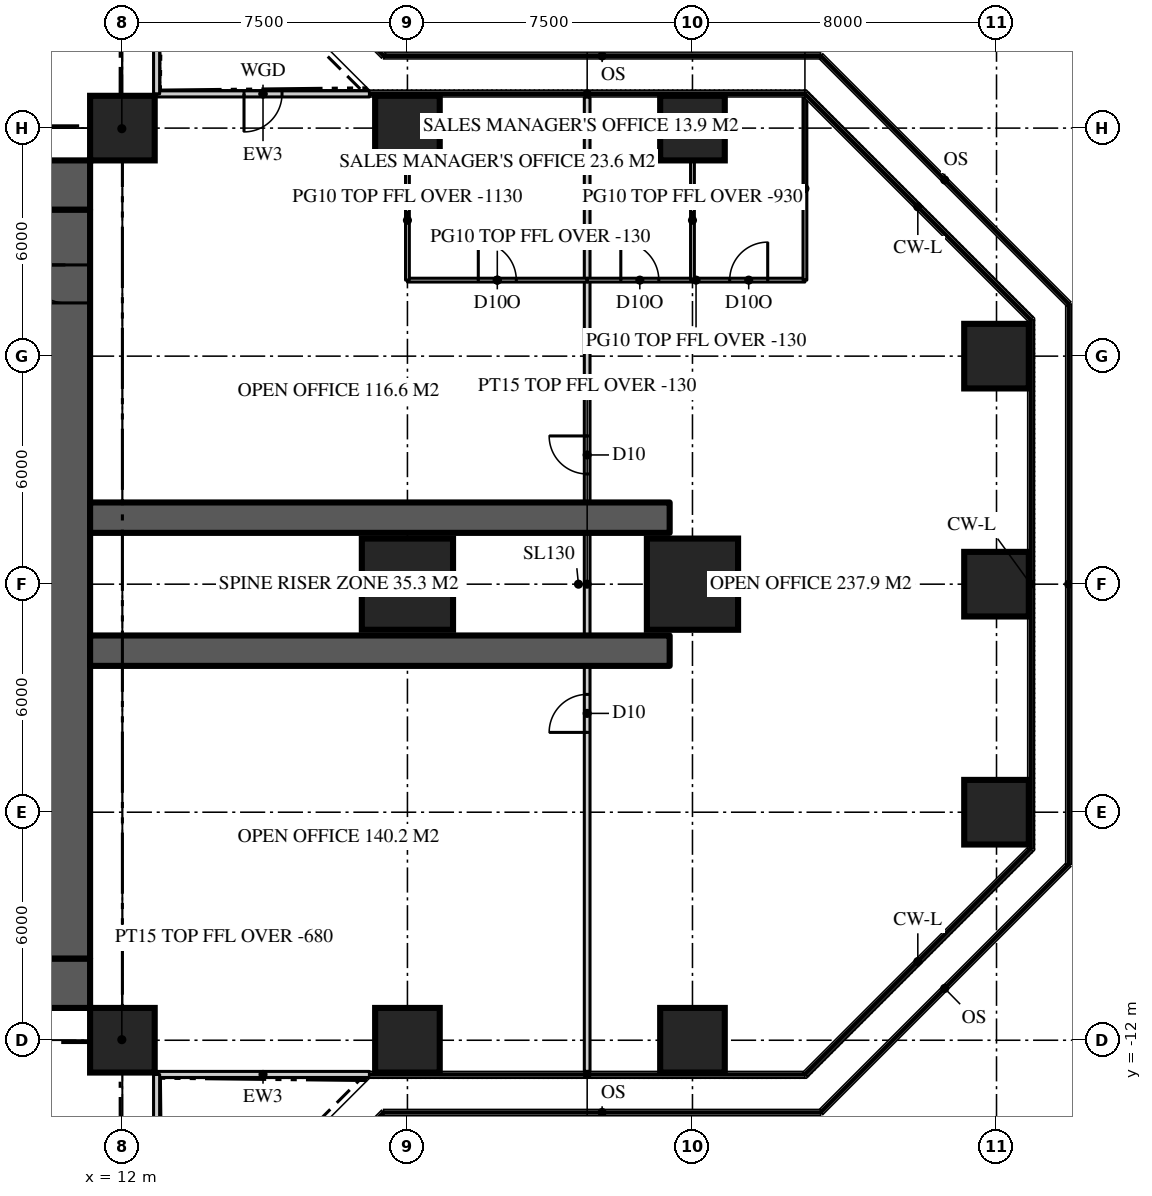
"""IFC4 building model, lengths in metres.
Left out: names, types, materials, properties, quantities, classifications, styles, units other than length and angle.
Written with IfcOpenShell. Run it as: python <this file> out.ifc"""

import sys

from ifc_helpers import new_model, si_unit, direction, frame, frame_2d, origin, origin_2d, place, context, subcontext, project, spatial, rectangle, extrude, element, fill, save


model = new_model("IFC4")
c1 = context("Model", 3, precision=1e-05, world=origin(), true_north=direction((0.0, 1.0)))
c2 = subcontext(c1, "Body", "Model", "MODEL_VIEW")
j1 = project(units=[si_unit("LENGTHUNIT", "METRE"), si_unit("PLANEANGLEUNIT", "RADIAN")], contexts=[c1])
p1 = place(None, origin())
s1 = spatial("IfcSite", under=j1, at=p1, CompositionType="ELEMENT")
p2 = place(p1, origin())
s2 = spatial("IfcBuilding", under=s1, at=p2, CompositionType="ELEMENT")
p3 = place(p2, frame((0.0, 0.0, 94.2)))
s3 = spatial("IfcBuildingStorey", under=s2, at=p3, CompositionType="ELEMENT", Elevation=94.2)
p4 = place(p3, frame((-11.15, 10.5, 0.0), z_axis=(0.0, 0.0, 1.0), x_axis=(1.0, 0.0, 0.0)))
e1 = element("IfcWall", 1, at=p4, inside=s3, PredefinedType="SHEAR", context=c2, shape_type="SweptSolid", body=[
    extrude(rectangle(XDim=22.3, YDim=1.3, at=frame_2d((11.15, 0.0))), origin(), (0.0, 0.0, 1.0), 3.9),
])
p5 = place(p4, frame((4.25, 0.0, 0.0)))
e2 = element("IfcOpeningElement", 2, at=p5, cuts=e1, PredefinedType="OPENING", context=c2, shape_type="SweptSolid", body=[
    extrude(rectangle(XDim=1.8, YDim=2.2, at=frame_2d((0.9, 1.1))), frame((0.0, 0.66, 0.0), z_axis=(0.0, -1.0, 0.0), x_axis=(1.0, 0.0, 0.0)), (0.0, 0.0, 1.0), 1.32),
])
p6 = place(p4, frame((16.25, 0.0, 0.0)))
e3 = element("IfcOpeningElement", 3, at=p6, cuts=e1, PredefinedType="OPENING", context=c2, shape_type="SweptSolid", body=[
    extrude(rectangle(XDim=1.8, YDim=2.2, at=frame_2d((0.9, 1.1))), frame((0.0, 0.66, 0.0), z_axis=(0.0, -1.0, 0.0), x_axis=(1.0, 0.0, 0.0)), (0.0, 0.0, 1.0), 1.32),
])
p7 = place(p3, frame((11.15, -10.5, 0.0), z_axis=(0.0, 0.0, 1.0), x_axis=(-1.0, 0.0, 0.0)))
e4 = element("IfcWall", 4, at=p7, inside=s3, PredefinedType="SHEAR", context=c2, shape_type="SweptSolid", body=[
    extrude(rectangle(XDim=22.3, YDim=1.3, at=frame_2d((11.15, 0.0))), origin(), (0.0, 0.0, 1.0), 3.9),
])
p8 = place(p7, frame((16.25, 0.0, 0.0)))
e5 = element("IfcOpeningElement", 5, at=p8, cuts=e4, PredefinedType="OPENING", context=c2, shape_type="SweptSolid", body=[
    extrude(rectangle(XDim=1.8, YDim=2.2, at=frame_2d((0.9, 1.1))), frame((0.0, 0.66, 0.0), z_axis=(0.0, -1.0, 0.0), x_axis=(1.0, 0.0, 0.0)), (0.0, 0.0, 1.0), 1.32),
])
p9 = place(p7, frame((4.25, 0.0, 0.0)))
e6 = element("IfcOpeningElement", 6, at=p9, cuts=e4, PredefinedType="OPENING", context=c2, shape_type="SweptSolid", body=[
    extrude(rectangle(XDim=1.8, YDim=2.2, at=frame_2d((0.9, 1.1))), frame((0.0, 0.66, 0.0), z_axis=(0.0, -1.0, 0.0), x_axis=(1.0, 0.0, 0.0)), (0.0, 0.0, 1.0), 1.32),
])
p10 = place(p3, frame((10.5, -9.85, 0.0), z_axis=(0.0, 0.0, 1.0), x_axis=(0.0, 1.0, 0.0)))
e7 = element("IfcWall", 7, at=p10, inside=s3, PredefinedType="SHEAR", context=c2, shape_type="SweptSolid", body=[
    extrude(rectangle(XDim=19.7, YDim=1.3, at=frame_2d((9.85, 0.0))), origin(), (0.0, 0.0, 1.0), 3.9),
])
p11 = place(p10, frame((17.25, 0.0, 0.0)))
e8 = element("IfcOpeningElement", 8, at=p11, cuts=e7, PredefinedType="OPENING", context=c2, shape_type="SweptSolid", body=[
    extrude(rectangle(XDim=1.0, YDim=2.2, at=frame_2d((0.5, 1.1))), frame((0.0, 0.66, 0.0), z_axis=(0.0, -1.0, 0.0), x_axis=(1.0, 0.0, 0.0)), (0.0, 0.0, 1.0), 1.32),
])
for number, where, z_axis, x_axis in (
    (9, (11.15, -1.75, 0.0), (0.0, 0.0, 1.0), (1.0, 0.0, 0.0)),
    (10, (11.15, 1.75, 0.0), (0.0, 0.0, 1.0), (1.0, 0.0, 0.0)),
):
    element("IfcWall", number, at=place(p3, frame(where, z_axis=z_axis, x_axis=x_axis)), inside=s3, PredefinedType="SHEAR", context=c2, shape_type="SweptSolid", body=[
        extrude(rectangle(XDim=15.25, YDim=0.8, at=frame_2d((7.625, 0.0))), origin(), (0.0, 0.0, 1.0), 3.9),
    ])
for number, where, z_axis, x_axis in (
    (11, (12.0, -12.0, 0.0), (0.0, 0.0, 1.0), (1.0, 0.0, 0.0)),
    (12, (19.5, -12.0, 0.0), (0.0, 0.0, 1.0), (1.0, 0.0, 0.0)),
    (13, (27.0, -12.0, 0.0), (0.0, 0.0, 1.0), (1.0, 0.0, 0.0)),
    (14, (35.0, -6.0, 0.0), (0.0, 0.0, 1.0), (1.0, 0.0, 0.0)),
):
    element("IfcColumn", number, at=place(p3, frame(where, z_axis=z_axis, x_axis=x_axis)), inside=s3, PredefinedType="COLUMN", context=c2, shape_type="SweptSolid", body=[
        extrude(rectangle(XDim=1.7, YDim=1.7, at=origin_2d()), origin(), (0.0, 0.0, 1.0), 3.9),
    ])
for number, where, z_axis, x_axis in (
    (15, (19.5, 0.0, 0.0), (0.0, 0.0, 1.0), (1.0, 0.0, 0.0)),
    (16, (27.0, 0.0, 0.0), (0.0, 0.0, 1.0), (1.0, 0.0, 0.0)),
):
    element("IfcColumn", number, at=place(p3, frame(where, z_axis=z_axis, x_axis=x_axis)), inside=s3, PredefinedType="COLUMN", context=c2, shape_type="SweptSolid", body=[
        extrude(rectangle(XDim=2.4, YDim=2.4, at=origin_2d()), origin(), (0.0, 0.0, 1.0), 3.9),
    ])
for number, where, z_axis, x_axis in (
    (17, (35.0, 0.0, 0.0), (0.0, 0.0, 1.0), (1.0, 0.0, 0.0)),
    (18, (35.0, 6.0, 0.0), (0.0, 0.0, 1.0), (1.0, 0.0, 0.0)),
    (19, (12.0, 12.0, 0.0), (0.0, 0.0, 1.0), (1.0, 0.0, 0.0)),
    (20, (19.5, 12.0, 0.0), (0.0, 0.0, 1.0), (1.0, 0.0, 0.0)),
    (21, (27.0, 12.0, 0.0), (0.0, 0.0, 1.0), (1.0, 0.0, 0.0)),
):
    element("IfcColumn", number, at=place(p3, frame(where, z_axis=z_axis, x_axis=x_axis)), inside=s3, PredefinedType="COLUMN", context=c2, shape_type="SweptSolid", body=[
        extrude(rectangle(XDim=1.7, YDim=1.7, at=origin_2d()), origin(), (0.0, 0.0, 1.0), 3.9),
    ])
p12 = place(p3, frame((12.9, -12.9, 0.0), z_axis=(0.0, 0.0, 1.0), x_axis=(1.0, 0.0, 0.0)))
e22 = element("IfcWall", 22, at=p12, inside=s3, PredefinedType="SOLIDWALL", context=c2, shape_type="SweptSolid", body=[
    extrude(rectangle(XDim=5.6, YDim=0.16, at=frame_2d((2.8, 0.0))), origin(), (0.0, 0.0, 1.0), 3.77),
])
p13 = place(p3, frame((18.5, 12.9, 0.0), z_axis=(0.0, 0.0, 1.0), x_axis=(-1.0, 0.0, 0.0)))
e23 = element("IfcWall", 23, at=p13, inside=s3, PredefinedType="SOLIDWALL", context=c2, shape_type="SweptSolid", body=[
    extrude(rectangle(XDim=5.6, YDim=0.16, at=frame_2d((2.8, 0.0))), origin(), (0.0, 0.0, 1.0), 3.77),
])
p14 = place(p13, frame((2.3, 0.0, 0.0)))
e24 = element("IfcOpeningElement", 24, at=p14, cuts=e23, PredefinedType="OPENING", context=c2, shape_type="SweptSolid", body=[
    extrude(rectangle(XDim=1.0, YDim=2.2, at=frame_2d((0.5, 1.1))), frame((0.0, 0.09, 0.0), z_axis=(0.0, -1.0, 0.0), x_axis=(1.0, 0.0, 0.0)), (0.0, 0.0, 1.0), 0.18),
])
p15 = place(p3, frame((12.9, 12.9, 0.0), z_axis=(0.0, 0.0, 1.0), x_axis=(0.0, 1.0, 0.0)))
e25 = element("IfcWall", 25, at=p15, inside=s3, PredefinedType="SOLIDWALL", context=c2, shape_type="SweptSolid", body=[
    extrude(rectangle(XDim=5.6, YDim=0.16, at=frame_2d((2.8, 0.0))), origin(), (0.0, 0.0, 1.0), 3.77),
])
p16 = place(p3, frame((12.9, -18.5, 0.0), z_axis=(0.0, 0.0, 1.0), x_axis=(0.0, 1.0, 0.0)))
e26 = element("IfcWall", 26, at=p16, inside=s3, PredefinedType="SOLIDWALL", context=c2, shape_type="SweptSolid", body=[
    extrude(rectangle(XDim=5.6, YDim=0.16, at=frame_2d((2.8, 0.0))), origin(), (0.0, 0.0, 1.0), 3.77),
])
p17 = place(p16, frame((2.3, 0.0, 0.0)))
e27 = element("IfcOpeningElement", 27, at=p17, cuts=e26, PredefinedType="OPENING", context=c2, shape_type="SweptSolid", body=[
    extrude(rectangle(XDim=1.0, YDim=2.2, at=frame_2d((0.5, 1.1))), frame((0.0, 0.09, 0.0), z_axis=(0.0, -1.0, 0.0), x_axis=(1.0, 0.0, 0.0)), (0.0, 0.0, 1.0), 0.18),
])
p18 = place(p3, frame((24.229, -12.82, 0.0), z_axis=(0.0, 0.0, 1.0), x_axis=(0.0, 1.0, 0.0)))
e28 = element("IfcWall", 28, at=p18, inside=s3, PredefinedType="PARTITIONING", context=c2, shape_type="SweptSolid", body=[
    extrude(rectangle(XDim=25.64, YDim=0.15, at=frame_2d((12.82, 0.0))), origin(), (0.0, 0.0, 1.0), 3.77),
])
p19 = place(p18, frame((15.72, 0.0, 0.0)))
e29 = element("IfcOpeningElement", 29, at=p19, cuts=e28, PredefinedType="OPENING", context=c2, shape_type="SweptSolid", body=[
    extrude(rectangle(XDim=1.0, YDim=2.2, at=frame_2d((0.5, 1.1))), frame((0.0, 0.085, 0.0), z_axis=(0.0, -1.0, 0.0), x_axis=(1.0, 0.0, 0.0)), (0.0, 0.0, 1.0), 0.17),
])
p20 = place(p18, frame((8.92, 0.0, 0.0)))
e30 = element("IfcOpeningElement", 30, at=p20, cuts=e28, PredefinedType="OPENING", context=c2, shape_type="SweptSolid", body=[
    extrude(rectangle(XDim=1.0, YDim=2.2, at=frame_2d((0.5, 1.1))), frame((0.0, 0.085, 0.0), z_axis=(0.0, -1.0, 0.0), x_axis=(1.0, 0.0, 0.0)), (0.0, 0.0, 1.0), 0.17),
])
p21 = place(p3, frame((19.5, 8.0, 0.0), z_axis=(0.0, 0.0, 1.0), x_axis=(1.0, 0.0, 0.0)))
e31 = element("IfcWall", 31, at=p21, inside=s3, PredefinedType="PARTITIONING", context=c2, shape_type="SweptSolid", body=[
    extrude(rectangle(XDim=4.729, YDim=0.1, at=frame_2d((2.365, 0.0))), origin(), (0.0, 0.0, 1.0), 3.77),
])
p22 = place(p21, frame((1.865, 0.0, 0.0)))
e32 = element("IfcOpeningElement", 32, at=p22, cuts=e31, PredefinedType="OPENING", context=c2, shape_type="SweptSolid", body=[
    extrude(rectangle(XDim=1.0, YDim=2.2, at=frame_2d((0.5, 1.1))), frame((0.0, 0.06, 0.0), z_axis=(0.0, -1.0, 0.0), x_axis=(1.0, 0.0, 0.0)), (0.0, 0.0, 1.0), 0.12),
])
p23 = place(p3, frame((24.229, 8.0, 0.0), z_axis=(0.0, 0.0, 1.0), x_axis=(1.0, 0.0, 0.0)))
e33 = element("IfcWall", 33, at=p23, inside=s3, PredefinedType="PARTITIONING", context=c2, shape_type="SweptSolid", body=[
    extrude(rectangle(XDim=5.73, YDim=0.1, at=frame_2d((2.865, 0.0))), origin(), (0.0, 0.0, 1.0), 3.77),
])
p24 = place(p23, frame((0.885, 0.0, 0.0)))
e34 = element("IfcOpeningElement", 34, at=p24, cuts=e33, PredefinedType="OPENING", context=c2, shape_type="SweptSolid", body=[
    extrude(rectangle(XDim=1.0, YDim=2.2, at=frame_2d((0.5, 1.1))), frame((0.0, 0.06, 0.0), z_axis=(0.0, -1.0, 0.0), x_axis=(1.0, 0.0, 0.0)), (0.0, 0.0, 1.0), 0.12),
])
p25 = place(p23, frame((3.75, 0.0, 0.0)))
e35 = element("IfcOpeningElement", 35, at=p25, cuts=e33, PredefinedType="OPENING", context=c2, shape_type="SweptSolid", body=[
    extrude(rectangle(XDim=1.0, YDim=2.2, at=frame_2d((0.5, 1.1))), frame((0.0, 0.06, 0.0), z_axis=(0.0, -1.0, 0.0), x_axis=(1.0, 0.0, 0.0)), (0.0, 0.0, 1.0), 0.12),
])
p26 = place(p3, frame((19.5, 8.0, 0.0), z_axis=(0.0, 0.0, 1.0), x_axis=(0.0, 1.0, 0.0)))
e36 = element("IfcWall", 36, at=p26, inside=s3, PredefinedType="PARTITIONING", context=c2, shape_type="SweptSolid", body=[
    extrude(rectangle(XDim=3.15, YDim=0.1, at=frame_2d((1.575, 0.0))), origin(), (0.0, 0.0, 1.0), 2.77),
])
p27 = place(p3, frame((27.0, 8.0, 0.0), z_axis=(0.0, 0.0, 1.0), x_axis=(0.0, 1.0, 0.0)))
e37 = element("IfcWall", 37, at=p27, inside=s3, PredefinedType="PARTITIONING", context=c2, shape_type="SweptSolid", body=[
    extrude(rectangle(XDim=3.15, YDim=0.1, at=frame_2d((1.575, 0.0))), origin(), (0.0, 0.0, 1.0), 2.97),
])
p28 = place(p3, frame((29.959, 8.0, 0.0), z_axis=(0.0, 0.0, 1.0), x_axis=(0.0, 1.0, 0.0)))
e38 = element("IfcWall", 38, at=p28, inside=s3, PredefinedType="PARTITIONING", context=c2, shape_type="SweptSolid", body=[
    extrude(rectangle(XDim=4.82, YDim=0.1, at=frame_2d((2.41, 0.0))), origin(), (0.0, 0.0, 1.0), 3.77),
])
for number, where, z_axis, x_axis in (
    (39, (11.15, 11.15, 0.0), (0.0, 0.0, 1.0), (0.707, 0.707, 0.0)),
    (40, (11.15, -11.15, 0.0), (0.0, 0.0, 1.0), (0.707, -0.707, 0.0)),
):
    element("IfcWall", number, at=place(p3, frame(where, z_axis=z_axis, x_axis=x_axis)), inside=s3, PredefinedType="PARTITIONING", context=c2, shape_type="SweptSolid", body=[
        extrude(rectangle(XDim=2.362, YDim=0.15, at=frame_2d((1.181, 0.0))), origin(), (0.0, 0.0, 1.0), 3.22),
    ])
p29 = place(p14, origin())
e41 = element("IfcDoor", 41, at=p29, inside=s3, OperationType="SINGLE_SWING_RIGHT", PredefinedType="DOOR", context=c2, shape_type="SweptSolid", body=[
    extrude(rectangle(XDim=1.0, YDim=2.2, at=frame_2d((0.5, 1.1))), frame((0.0, 0.025, 0.0), z_axis=(0.0, -1.0, 0.0), x_axis=(1.0, 0.0, 0.0)), (0.0, 0.0, 1.0), 0.05),
])
fill(e24, e41)
p30 = place(p11, origin())
e42 = element("IfcDoor", 42, at=p30, inside=s3, OperationType="SINGLE_SWING_RIGHT", PredefinedType="DOOR", context=c2, shape_type="SweptSolid", body=[
    extrude(rectangle(XDim=1.0, YDim=2.2, at=frame_2d((0.5, 1.1))), frame((0.0, 0.025, 0.0), z_axis=(0.0, -1.0, 0.0), x_axis=(1.0, 0.0, 0.0)), (0.0, 0.0, 1.0), 0.05),
])
fill(e8, e42)
p31 = place(p19, origin())
e43 = element("IfcDoor", 43, at=p31, inside=s3, OperationType="SINGLE_SWING_RIGHT", PredefinedType="DOOR", context=c2, shape_type="SweptSolid", body=[
    extrude(rectangle(XDim=1.0, YDim=2.2, at=frame_2d((0.5, 1.1))), frame((0.0, 0.025, 0.0), z_axis=(0.0, -1.0, 0.0), x_axis=(1.0, 0.0, 0.0)), (0.0, 0.0, 1.0), 0.05),
])
fill(e29, e43)
p32 = place(p20, origin())
e44 = element("IfcDoor", 44, at=p32, inside=s3, OperationType="SINGLE_SWING_LEFT", PredefinedType="DOOR", context=c2, shape_type="SweptSolid", body=[
    extrude(rectangle(XDim=1.0, YDim=2.2, at=frame_2d((0.5, 1.1))), frame((0.0, 0.025, 0.0), z_axis=(0.0, -1.0, 0.0), x_axis=(1.0, 0.0, 0.0)), (0.0, 0.0, 1.0), 0.05),
])
fill(e30, e44)
p33 = place(p22, origin())
e45 = element("IfcDoor", 45, at=p33, inside=s3, OperationType="SINGLE_SWING_LEFT", PredefinedType="DOOR", context=c2, shape_type="SweptSolid", body=[
    extrude(rectangle(XDim=1.0, YDim=2.2, at=frame_2d((0.5, 1.1))), frame((0.0, 0.025, 0.0), z_axis=(0.0, -1.0, 0.0), x_axis=(1.0, 0.0, 0.0)), (0.0, 0.0, 1.0), 0.05),
])
fill(e32, e45)
p34 = place(p24, origin())
e46 = element("IfcDoor", 46, at=p34, inside=s3, OperationType="SINGLE_SWING_LEFT", PredefinedType="DOOR", context=c2, shape_type="SweptSolid", body=[
    extrude(rectangle(XDim=1.0, YDim=2.2, at=frame_2d((0.5, 1.1))), frame((0.0, 0.025, 0.0), z_axis=(0.0, -1.0, 0.0), x_axis=(1.0, 0.0, 0.0)), (0.0, 0.0, 1.0), 0.05),
])
fill(e34, e46)
p35 = place(p25, origin())
e47 = element("IfcDoor", 47, at=p35, inside=s3, OperationType="SINGLE_SWING_RIGHT", PredefinedType="DOOR", context=c2, shape_type="SweptSolid", body=[
    extrude(rectangle(XDim=1.0, YDim=2.2, at=frame_2d((0.5, 1.1))), frame((0.0, 0.025, 0.0), z_axis=(0.0, -1.0, 0.0), x_axis=(1.0, 0.0, 0.0)), (0.0, 0.0, 1.0), 0.05),
])
fill(e35, e47)
save(model, sys.argv[1])
